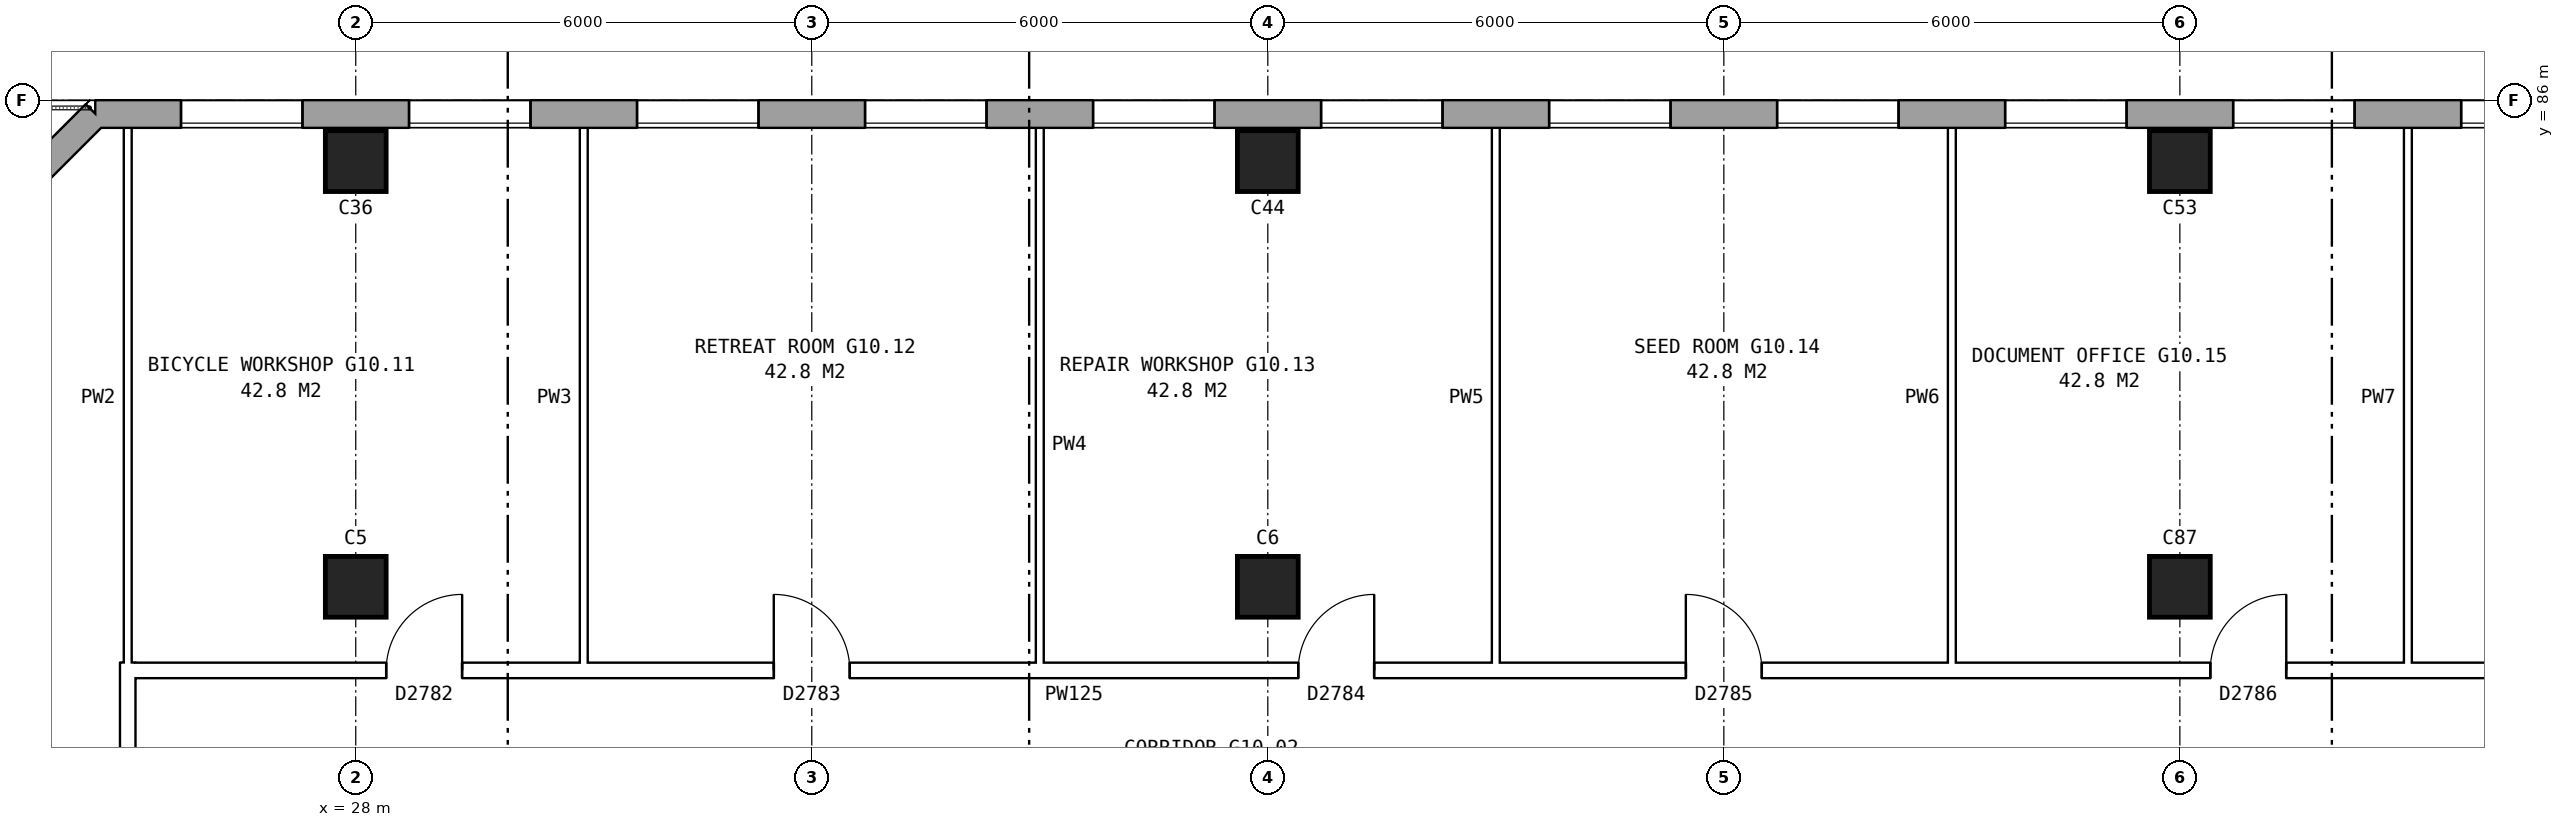
"""IFC4 building model, lengths in metres.
Left out: names, types, materials, properties, quantities, classifications, styles, units other than length and angle.
Written with IfcOpenShell. Run it as: python <this file> out.ifc"""

import sys

from ifc_helpers import new_model, si_unit, direction, frame, frame_2d, origin, origin_2d, place, context, subcontext, project, spatial, rectangle, extrude, element, fill, save


model = new_model("IFC4")
c1 = context("Model", 3, precision=1e-05, world=origin(), true_north=direction((0.0, 1.0)))
c2 = subcontext(c1, "Body", "Model", "MODEL_VIEW")
j1 = project(units=[si_unit("LENGTHUNIT", "METRE"), si_unit("PLANEANGLEUNIT", "RADIAN")], contexts=[c1])
p1 = place(None, origin())
s1 = spatial("IfcSite", under=j1, at=p1, CompositionType="ELEMENT")
p2 = place(p1, origin())
s2 = spatial("IfcBuilding", under=s1, at=p2, CompositionType="ELEMENT")
p3 = place(p2, frame((0.0, 0.0, 38.1)))
s3 = spatial("IfcBuildingStorey", under=s2, at=p3, CompositionType="ELEMENT", Elevation=38.1)
for number, where, z_axis, x_axis in (
    (1, (28.0, 79.6, 0.0), (0.0, 0.0, 1.0), (1.0, 0.0, 0.0)),
    (2, (28.0, 85.2, 0.0), (0.0, 0.0, 1.0), (1.0, 0.0, 0.0)),
    (3, (40.0, 79.6, 0.0), (0.0, 0.0, 1.0), (1.0, 0.0, 0.0)),
    (4, (40.0, 85.2, 0.0), (0.0, 0.0, 1.0), (1.0, 0.0, 0.0)),
    (5, (52.0, 79.6, 0.0), (0.0, 0.0, 1.0), (1.0, 0.0, 0.0)),
    (6, (52.0, 85.2, 0.0), (0.0, 0.0, 1.0), (1.0, 0.0, 0.0)),
):
    element("IfcColumn", number, at=place(p3, frame(where, z_axis=z_axis, x_axis=x_axis)), inside=s3, PredefinedType="COLUMN", context=c2, shape_type="SweptSolid", body=[
        extrude(rectangle(XDim=0.8, YDim=0.8, at=origin_2d()), origin(), (0.0, 0.0, 1.0), 5.6),
    ])
p4 = place(p3, frame((72.925, 85.82, 0.0), z_axis=(0.0, 0.0, 1.0), x_axis=(-1.0, 0.0, 0.0)))
e7 = element("IfcWall", 7, at=p4, inside=s3, PredefinedType="STANDARD", context=c2, shape_type="SweptSolid", body=[
    extrude(rectangle(XDim=48.351, YDim=0.36, at=frame_2d((24.175, 0.0))), origin(), (0.0, 0.0, 1.0), 5.6),
])
p5 = place(p4, frame((0.625, 0.0, 0.15)))
e8 = element("IfcOpeningElement", 8, at=p5, cuts=e7, PredefinedType="OPENING", context=c2, shape_type="SweptSolid", body=[
    extrude(rectangle(XDim=1.6, YDim=2.4, at=frame_2d((0.8, 1.2))), frame((0.0, 0.19, 0.0), z_axis=(0.0, -1.0, 0.0), x_axis=(1.0, 0.0, 0.0)), (0.0, 0.0, 1.0), 0.38),
])
p6 = place(p4, frame((3.625, 0.0, 0.15)))
e9 = element("IfcOpeningElement", 9, at=p6, cuts=e7, PredefinedType="OPENING", context=c2, shape_type="SweptSolid", body=[
    extrude(rectangle(XDim=1.6, YDim=2.4, at=frame_2d((0.8, 1.2))), frame((0.0, 0.19, 0.0), z_axis=(0.0, -1.0, 0.0), x_axis=(1.0, 0.0, 0.0)), (0.0, 0.0, 1.0), 0.38),
])
p7 = place(p4, frame((6.625, 0.0, 0.15)))
e10 = element("IfcOpeningElement", 10, at=p7, cuts=e7, PredefinedType="OPENING", context=c2, shape_type="SweptSolid", body=[
    extrude(rectangle(XDim=1.6, YDim=2.4, at=frame_2d((0.8, 1.2))), frame((0.0, 0.19, 0.0), z_axis=(0.0, -1.0, 0.0), x_axis=(1.0, 0.0, 0.0)), (0.0, 0.0, 1.0), 0.38),
])
p8 = place(p4, frame((9.625, 0.0, 0.15)))
e11 = element("IfcOpeningElement", 11, at=p8, cuts=e7, PredefinedType="OPENING", context=c2, shape_type="SweptSolid", body=[
    extrude(rectangle(XDim=1.6, YDim=2.4, at=frame_2d((0.8, 1.2))), frame((0.0, 0.19, 0.0), z_axis=(0.0, -1.0, 0.0), x_axis=(1.0, 0.0, 0.0)), (0.0, 0.0, 1.0), 0.38),
])
p9 = place(p4, frame((12.625, 0.0, 0.15)))
e12 = element("IfcOpeningElement", 12, at=p9, cuts=e7, PredefinedType="OPENING", context=c2, shape_type="SweptSolid", body=[
    extrude(rectangle(XDim=1.6, YDim=2.4, at=frame_2d((0.8, 1.2))), frame((0.0, 0.19, 0.0), z_axis=(0.0, -1.0, 0.0), x_axis=(1.0, 0.0, 0.0)), (0.0, 0.0, 1.0), 0.38),
])
p10 = place(p4, frame((15.625, 0.0, 0.15)))
e13 = element("IfcOpeningElement", 13, at=p10, cuts=e7, PredefinedType="OPENING", context=c2, shape_type="SweptSolid", body=[
    extrude(rectangle(XDim=1.6, YDim=2.4, at=frame_2d((0.8, 1.2))), frame((0.0, 0.19, 0.0), z_axis=(0.0, -1.0, 0.0), x_axis=(1.0, 0.0, 0.0)), (0.0, 0.0, 1.0), 0.38),
])
p11 = place(p4, frame((18.625, 0.0, 0.15)))
e14 = element("IfcOpeningElement", 14, at=p11, cuts=e7, PredefinedType="OPENING", context=c2, shape_type="SweptSolid", body=[
    extrude(rectangle(XDim=1.6, YDim=2.4, at=frame_2d((0.8, 1.2))), frame((0.0, 0.19, 0.0), z_axis=(0.0, -1.0, 0.0), x_axis=(1.0, 0.0, 0.0)), (0.0, 0.0, 1.0), 0.38),
])
p12 = place(p4, frame((21.625, 0.0, 0.15)))
e15 = element("IfcOpeningElement", 15, at=p12, cuts=e7, PredefinedType="OPENING", context=c2, shape_type="SweptSolid", body=[
    extrude(rectangle(XDim=1.6, YDim=2.4, at=frame_2d((0.8, 1.2))), frame((0.0, 0.19, 0.0), z_axis=(0.0, -1.0, 0.0), x_axis=(1.0, 0.0, 0.0)), (0.0, 0.0, 1.0), 0.38),
])
p13 = place(p4, frame((24.625, 0.0, 0.15)))
e16 = element("IfcOpeningElement", 16, at=p13, cuts=e7, PredefinedType="OPENING", context=c2, shape_type="SweptSolid", body=[
    extrude(rectangle(XDim=1.6, YDim=2.4, at=frame_2d((0.8, 1.2))), frame((0.0, 0.19, 0.0), z_axis=(0.0, -1.0, 0.0), x_axis=(1.0, 0.0, 0.0)), (0.0, 0.0, 1.0), 0.38),
])
p14 = place(p4, frame((27.625, 0.0, 0.15)))
e17 = element("IfcOpeningElement", 17, at=p14, cuts=e7, PredefinedType="OPENING", context=c2, shape_type="SweptSolid", body=[
    extrude(rectangle(XDim=1.6, YDim=2.4, at=frame_2d((0.8, 1.2))), frame((0.0, 0.19, 0.0), z_axis=(0.0, -1.0, 0.0), x_axis=(1.0, 0.0, 0.0)), (0.0, 0.0, 1.0), 0.38),
])
p15 = place(p4, frame((30.625, 0.0, 0.15)))
e18 = element("IfcOpeningElement", 18, at=p15, cuts=e7, PredefinedType="OPENING", context=c2, shape_type="SweptSolid", body=[
    extrude(rectangle(XDim=1.6, YDim=2.4, at=frame_2d((0.8, 1.2))), frame((0.0, 0.19, 0.0), z_axis=(0.0, -1.0, 0.0), x_axis=(1.0, 0.0, 0.0)), (0.0, 0.0, 1.0), 0.38),
])
p16 = place(p4, frame((33.625, 0.0, 0.15)))
e19 = element("IfcOpeningElement", 19, at=p16, cuts=e7, PredefinedType="OPENING", context=c2, shape_type="SweptSolid", body=[
    extrude(rectangle(XDim=1.6, YDim=2.4, at=frame_2d((0.8, 1.2))), frame((0.0, 0.19, 0.0), z_axis=(0.0, -1.0, 0.0), x_axis=(1.0, 0.0, 0.0)), (0.0, 0.0, 1.0), 0.38),
])
p17 = place(p4, frame((36.625, 0.0, 0.15)))
e20 = element("IfcOpeningElement", 20, at=p17, cuts=e7, PredefinedType="OPENING", context=c2, shape_type="SweptSolid", body=[
    extrude(rectangle(XDim=1.6, YDim=2.4, at=frame_2d((0.8, 1.2))), frame((0.0, 0.19, 0.0), z_axis=(0.0, -1.0, 0.0), x_axis=(1.0, 0.0, 0.0)), (0.0, 0.0, 1.0), 0.38),
])
p18 = place(p4, frame((39.625, 0.0, 0.15)))
e21 = element("IfcOpeningElement", 21, at=p18, cuts=e7, PredefinedType="OPENING", context=c2, shape_type="SweptSolid", body=[
    extrude(rectangle(XDim=1.6, YDim=2.4, at=frame_2d((0.8, 1.2))), frame((0.0, 0.19, 0.0), z_axis=(0.0, -1.0, 0.0), x_axis=(1.0, 0.0, 0.0)), (0.0, 0.0, 1.0), 0.38),
])
p19 = place(p4, frame((42.625, 0.0, 0.15)))
e22 = element("IfcOpeningElement", 22, at=p19, cuts=e7, PredefinedType="OPENING", context=c2, shape_type="SweptSolid", body=[
    extrude(rectangle(XDim=1.6, YDim=2.4, at=frame_2d((0.8, 1.2))), frame((0.0, 0.19, 0.0), z_axis=(0.0, -1.0, 0.0), x_axis=(1.0, 0.0, 0.0)), (0.0, 0.0, 1.0), 0.38),
])
p20 = place(p4, frame((45.625, 0.0, 0.15)))
e23 = element("IfcOpeningElement", 23, at=p20, cuts=e7, PredefinedType="OPENING", context=c2, shape_type="SweptSolid", body=[
    extrude(rectangle(XDim=1.6, YDim=2.4, at=frame_2d((0.8, 1.2))), frame((0.0, 0.19, 0.0), z_axis=(0.0, -1.0, 0.0), x_axis=(1.0, 0.0, 0.0)), (0.0, 0.0, 1.0), 0.38),
])
p21 = place(p3, frame((24.575, 85.82, 0.0), z_axis=(0.0, 0.0, 1.0), x_axis=(-0.707106781187, -0.707106781187, 0.0)))
e24 = element("IfcWall", 24, at=p21, inside=s3, PredefinedType="STANDARD", context=c2, shape_type="SweptSolid", body=[
    extrude(rectangle(XDim=4.094, YDim=0.36, at=frame_2d((2.047, 0.0))), origin(), (0.0, 0.0, 1.0), 5.6),
])
p22 = place(p3, frame((24.9, 78.5, 0.0), z_axis=(0.0, 0.0, 1.0), x_axis=(1.0, 0.0, 0.0)))
e25 = element("IfcWall", 25, at=p22, inside=s3, PredefinedType="PARTITIONING", context=c2, shape_type="SweptSolid", body=[
    extrude(rectangle(XDim=50.86, YDim=0.2, at=frame_2d((25.43, 0.0))), origin(), (0.0, 0.0, 1.0), 5.6),
])
p23 = place(p22, frame((3.5, 0.0, 0.0)))
e26 = element("IfcOpeningElement", 26, at=p23, cuts=e25, PredefinedType="OPENING", context=c2, shape_type="SweptSolid", body=[
    extrude(rectangle(XDim=1.0, YDim=2.1, at=frame_2d((0.5, 1.05))), frame((0.0, 0.11, 0.0), z_axis=(0.0, -1.0, 0.0), x_axis=(1.0, 0.0, 0.0)), (0.0, 0.0, 1.0), 0.22),
])
p24 = place(p22, frame((8.6, 0.0, 0.0)))
e27 = element("IfcOpeningElement", 27, at=p24, cuts=e25, PredefinedType="OPENING", context=c2, shape_type="SweptSolid", body=[
    extrude(rectangle(XDim=1.0, YDim=2.1, at=frame_2d((0.5, 1.05))), frame((0.0, 0.11, 0.0), z_axis=(0.0, -1.0, 0.0), x_axis=(1.0, 0.0, 0.0)), (0.0, 0.0, 1.0), 0.22),
])
p25 = place(p22, frame((15.5, 0.0, 0.0)))
e28 = element("IfcOpeningElement", 28, at=p25, cuts=e25, PredefinedType="OPENING", context=c2, shape_type="SweptSolid", body=[
    extrude(rectangle(XDim=1.0, YDim=2.1, at=frame_2d((0.5, 1.05))), frame((0.0, 0.11, 0.0), z_axis=(0.0, -1.0, 0.0), x_axis=(1.0, 0.0, 0.0)), (0.0, 0.0, 1.0), 0.22),
])
p26 = place(p22, frame((20.6, 0.0, 0.0)))
e29 = element("IfcOpeningElement", 29, at=p26, cuts=e25, PredefinedType="OPENING", context=c2, shape_type="SweptSolid", body=[
    extrude(rectangle(XDim=1.0, YDim=2.1, at=frame_2d((0.5, 1.05))), frame((0.0, 0.11, 0.0), z_axis=(0.0, -1.0, 0.0), x_axis=(1.0, 0.0, 0.0)), (0.0, 0.0, 1.0), 0.22),
])
p27 = place(p22, frame((27.5, 0.0, 0.0)))
e30 = element("IfcOpeningElement", 30, at=p27, cuts=e25, PredefinedType="OPENING", context=c2, shape_type="SweptSolid", body=[
    extrude(rectangle(XDim=1.0, YDim=2.1, at=frame_2d((0.5, 1.05))), frame((0.0, 0.11, 0.0), z_axis=(0.0, -1.0, 0.0), x_axis=(1.0, 0.0, 0.0)), (0.0, 0.0, 1.0), 0.22),
])
p28 = place(p22, frame((32.6, 0.0, 0.0)))
e31 = element("IfcOpeningElement", 31, at=p28, cuts=e25, PredefinedType="OPENING", context=c2, shape_type="SweptSolid", body=[
    extrude(rectangle(XDim=1.0, YDim=2.1, at=frame_2d((0.5, 1.05))), frame((0.0, 0.11, 0.0), z_axis=(0.0, -1.0, 0.0), x_axis=(1.0, 0.0, 0.0)), (0.0, 0.0, 1.0), 0.22),
])
p29 = place(p22, frame((36.92, 0.0, 0.0)))
e32 = element("IfcOpeningElement", 32, at=p29, cuts=e25, PredefinedType="OPENING", context=c2, shape_type="SweptSolid", body=[
    extrude(rectangle(XDim=1.0, YDim=2.1, at=frame_2d((0.5, 1.05))), frame((0.0, 0.11, 0.0), z_axis=(0.0, -1.0, 0.0), x_axis=(1.0, 0.0, 0.0)), (0.0, 0.0, 1.0), 0.22),
])
p30 = place(p22, frame((39.97, 0.0, 0.0)))
e33 = element("IfcOpeningElement", 33, at=p30, cuts=e25, PredefinedType="OPENING", context=c2, shape_type="SweptSolid", body=[
    extrude(rectangle(XDim=0.9, YDim=2.1, at=frame_2d((0.45, 1.05))), frame((0.0, 0.11, 0.0), z_axis=(0.0, -1.0, 0.0), x_axis=(1.0, 0.0, 0.0)), (0.0, 0.0, 1.0), 0.22),
])
p31 = place(p22, frame((43.15, 0.0, 0.0)))
e34 = element("IfcOpeningElement", 34, at=p31, cuts=e25, PredefinedType="OPENING", context=c2, shape_type="SweptSolid", body=[
    extrude(rectangle(XDim=0.9, YDim=2.1, at=frame_2d((0.45, 1.05))), frame((0.0, 0.11, 0.0), z_axis=(0.0, -1.0, 0.0), x_axis=(1.0, 0.0, 0.0)), (0.0, 0.0, 1.0), 0.22),
])
p32 = place(p22, frame((46.15, 0.0, 0.0)))
e35 = element("IfcOpeningElement", 35, at=p32, cuts=e25, PredefinedType="OPENING", context=c2, shape_type="SweptSolid", body=[
    extrude(rectangle(XDim=0.9, YDim=2.1, at=frame_2d((0.45, 1.05))), frame((0.0, 0.11, 0.0), z_axis=(0.0, -1.0, 0.0), x_axis=(1.0, 0.0, 0.0)), (0.0, 0.0, 1.0), 0.22),
])
p33 = place(p22, frame((48.92, 0.0, 0.0)))
e36 = element("IfcOpeningElement", 36, at=p33, cuts=e25, PredefinedType="OPENING", context=c2, shape_type="SweptSolid", body=[
    extrude(rectangle(XDim=1.0, YDim=2.1, at=frame_2d((0.5, 1.05))), frame((0.0, 0.11, 0.0), z_axis=(0.0, -1.0, 0.0), x_axis=(1.0, 0.0, 0.0)), (0.0, 0.0, 1.0), 0.22),
])
p34 = place(p3, frame((25.0, 76.1, 0.0), z_axis=(0.0, 0.0, 1.0), x_axis=(0.0, 1.0, 0.0)))
e37 = element("IfcWall", 37, at=p34, inside=s3, PredefinedType="PARTITIONING", context=c2, shape_type="SweptSolid", body=[
    extrude(rectangle(XDim=2.502, YDim=0.2, at=frame_2d((1.251, 0.0))), origin(), (0.0, 0.0, 1.0), 5.6),
])
for number, where, z_axis, x_axis in (
    (38, (25.0, 78.4, 0.0), (0.0, 0.0, 1.0), (0.0, 1.0, 0.0)),
    (39, (31.0, 78.4, 0.0), (0.0, 0.0, 1.0), (0.0, 1.0, 0.0)),
    (40, (37.0, 78.4, 0.0), (0.0, 0.0, 1.0), (0.0, 1.0, 0.0)),
    (41, (43.0, 78.4, 0.0), (0.0, 0.0, 1.0), (0.0, 1.0, 0.0)),
    (42, (49.0, 78.4, 0.0), (0.0, 0.0, 1.0), (0.0, 1.0, 0.0)),
    (43, (55.0, 78.4, 0.0), (0.0, 0.0, 1.0), (0.0, 1.0, 0.0)),
):
    element("IfcWall", number, at=place(p3, frame(where, z_axis=z_axis, x_axis=x_axis)), inside=s3, PredefinedType="PARTITIONING", context=c2, shape_type="SweptSolid", body=[
        extrude(rectangle(XDim=7.36, YDim=0.1, at=frame_2d((3.68, 0.0))), origin(), (0.0, 0.0, 1.0), 5.6),
    ])
p35 = place(p10, origin())
e44 = element("IfcWindow", 44, at=p35, inside=s3, PartitioningType="SINGLE_PANEL", PredefinedType="WINDOW", context=c2, shape_type="SweptSolid", body=[
    extrude(rectangle(XDim=1.6, YDim=2.4, at=frame_2d((0.8, 1.2))), frame((0.0, 0.15, 0.0), z_axis=(0.0, -1.0, 0.0), x_axis=(1.0, 0.0, 0.0)), (0.0, 0.0, 1.0), 0.06),
])
fill(e13, e44)
p36 = place(p11, origin())
e45 = element("IfcWindow", 45, at=p36, inside=s3, PartitioningType="SINGLE_PANEL", PredefinedType="WINDOW", context=c2, shape_type="SweptSolid", body=[
    extrude(rectangle(XDim=1.6, YDim=2.4, at=frame_2d((0.8, 1.2))), frame((0.0, 0.15, 0.0), z_axis=(0.0, -1.0, 0.0), x_axis=(1.0, 0.0, 0.0)), (0.0, 0.0, 1.0), 0.06),
])
fill(e14, e45)
p37 = place(p12, origin())
e46 = element("IfcWindow", 46, at=p37, inside=s3, PartitioningType="SINGLE_PANEL", PredefinedType="WINDOW", context=c2, shape_type="SweptSolid", body=[
    extrude(rectangle(XDim=1.6, YDim=2.4, at=frame_2d((0.8, 1.2))), frame((0.0, 0.15, 0.0), z_axis=(0.0, -1.0, 0.0), x_axis=(1.0, 0.0, 0.0)), (0.0, 0.0, 1.0), 0.06),
])
fill(e15, e46)
p38 = place(p13, origin())
e47 = element("IfcWindow", 47, at=p38, inside=s3, PartitioningType="SINGLE_PANEL", PredefinedType="WINDOW", context=c2, shape_type="SweptSolid", body=[
    extrude(rectangle(XDim=1.6, YDim=2.4, at=frame_2d((0.8, 1.2))), frame((0.0, 0.15, 0.0), z_axis=(0.0, -1.0, 0.0), x_axis=(1.0, 0.0, 0.0)), (0.0, 0.0, 1.0), 0.06),
])
fill(e16, e47)
p39 = place(p14, origin())
e48 = element("IfcWindow", 48, at=p39, inside=s3, PartitioningType="SINGLE_PANEL", PredefinedType="WINDOW", context=c2, shape_type="SweptSolid", body=[
    extrude(rectangle(XDim=1.6, YDim=2.4, at=frame_2d((0.8, 1.2))), frame((0.0, 0.15, 0.0), z_axis=(0.0, -1.0, 0.0), x_axis=(1.0, 0.0, 0.0)), (0.0, 0.0, 1.0), 0.06),
])
fill(e17, e48)
p40 = place(p15, origin())
e49 = element("IfcWindow", 49, at=p40, inside=s3, PartitioningType="SINGLE_PANEL", PredefinedType="WINDOW", context=c2, shape_type="SweptSolid", body=[
    extrude(rectangle(XDim=1.6, YDim=2.4, at=frame_2d((0.8, 1.2))), frame((0.0, 0.15, 0.0), z_axis=(0.0, -1.0, 0.0), x_axis=(1.0, 0.0, 0.0)), (0.0, 0.0, 1.0), 0.06),
])
fill(e18, e49)
p41 = place(p16, origin())
e50 = element("IfcWindow", 50, at=p41, inside=s3, PartitioningType="SINGLE_PANEL", PredefinedType="WINDOW", context=c2, shape_type="SweptSolid", body=[
    extrude(rectangle(XDim=1.6, YDim=2.4, at=frame_2d((0.8, 1.2))), frame((0.0, 0.15, 0.0), z_axis=(0.0, -1.0, 0.0), x_axis=(1.0, 0.0, 0.0)), (0.0, 0.0, 1.0), 0.06),
])
fill(e19, e50)
p42 = place(p17, origin())
e51 = element("IfcWindow", 51, at=p42, inside=s3, PartitioningType="SINGLE_PANEL", PredefinedType="WINDOW", context=c2, shape_type="SweptSolid", body=[
    extrude(rectangle(XDim=1.6, YDim=2.4, at=frame_2d((0.8, 1.2))), frame((0.0, 0.15, 0.0), z_axis=(0.0, -1.0, 0.0), x_axis=(1.0, 0.0, 0.0)), (0.0, 0.0, 1.0), 0.06),
])
fill(e20, e51)
p43 = place(p18, origin())
e52 = element("IfcWindow", 52, at=p43, inside=s3, PartitioningType="SINGLE_PANEL", PredefinedType="WINDOW", context=c2, shape_type="SweptSolid", body=[
    extrude(rectangle(XDim=1.6, YDim=2.4, at=frame_2d((0.8, 1.2))), frame((0.0, 0.15, 0.0), z_axis=(0.0, -1.0, 0.0), x_axis=(1.0, 0.0, 0.0)), (0.0, 0.0, 1.0), 0.06),
])
fill(e21, e52)
p44 = place(p19, origin())
e53 = element("IfcWindow", 53, at=p44, inside=s3, PartitioningType="SINGLE_PANEL", PredefinedType="WINDOW", context=c2, shape_type="SweptSolid", body=[
    extrude(rectangle(XDim=1.6, YDim=2.4, at=frame_2d((0.8, 1.2))), frame((0.0, 0.15, 0.0), z_axis=(0.0, -1.0, 0.0), x_axis=(1.0, 0.0, 0.0)), (0.0, 0.0, 1.0), 0.06),
])
fill(e22, e53)
p45 = place(p20, origin())
e54 = element("IfcWindow", 54, at=p45, inside=s3, PartitioningType="SINGLE_PANEL", PredefinedType="WINDOW", context=c2, shape_type="SweptSolid", body=[
    extrude(rectangle(XDim=1.6, YDim=2.4, at=frame_2d((0.8, 1.2))), frame((0.0, 0.15, 0.0), z_axis=(0.0, -1.0, 0.0), x_axis=(1.0, 0.0, 0.0)), (0.0, 0.0, 1.0), 0.06),
])
fill(e23, e54)
p46 = place(p23, origin())
e55 = element("IfcDoor", 55, at=p46, inside=s3, OperationType="SINGLE_SWING_RIGHT", PredefinedType="DOOR", context=c2, shape_type="SweptSolid", body=[
    extrude(rectangle(XDim=1.0, YDim=2.1, at=frame_2d((0.5, 1.05))), frame((0.0, 0.025, 0.0), z_axis=(0.0, -1.0, 0.0), x_axis=(1.0, 0.0, 0.0)), (0.0, 0.0, 1.0), 0.05),
])
fill(e26, e55)
p47 = place(p24, origin())
e56 = element("IfcDoor", 56, at=p47, inside=s3, OperationType="SINGLE_SWING_LEFT", PredefinedType="DOOR", context=c2, shape_type="SweptSolid", body=[
    extrude(rectangle(XDim=1.0, YDim=2.1, at=frame_2d((0.5, 1.05))), frame((0.0, 0.025, 0.0), z_axis=(0.0, -1.0, 0.0), x_axis=(1.0, 0.0, 0.0)), (0.0, 0.0, 1.0), 0.05),
])
fill(e27, e56)
p48 = place(p25, origin())
e57 = element("IfcDoor", 57, at=p48, inside=s3, OperationType="SINGLE_SWING_RIGHT", PredefinedType="DOOR", context=c2, shape_type="SweptSolid", body=[
    extrude(rectangle(XDim=1.0, YDim=2.1, at=frame_2d((0.5, 1.05))), frame((0.0, 0.025, 0.0), z_axis=(0.0, -1.0, 0.0), x_axis=(1.0, 0.0, 0.0)), (0.0, 0.0, 1.0), 0.05),
])
fill(e28, e57)
p49 = place(p26, origin())
e58 = element("IfcDoor", 58, at=p49, inside=s3, OperationType="SINGLE_SWING_LEFT", PredefinedType="DOOR", context=c2, shape_type="SweptSolid", body=[
    extrude(rectangle(XDim=1.0, YDim=2.1, at=frame_2d((0.5, 1.05))), frame((0.0, 0.025, 0.0), z_axis=(0.0, -1.0, 0.0), x_axis=(1.0, 0.0, 0.0)), (0.0, 0.0, 1.0), 0.05),
])
fill(e29, e58)
p50 = place(p27, origin())
e59 = element("IfcDoor", 59, at=p50, inside=s3, OperationType="SINGLE_SWING_RIGHT", PredefinedType="DOOR", context=c2, shape_type="SweptSolid", body=[
    extrude(rectangle(XDim=1.0, YDim=2.1, at=frame_2d((0.5, 1.05))), frame((0.0, 0.025, 0.0), z_axis=(0.0, -1.0, 0.0), x_axis=(1.0, 0.0, 0.0)), (0.0, 0.0, 1.0), 0.05),
])
fill(e30, e59)
save(model, sys.argv[1])
